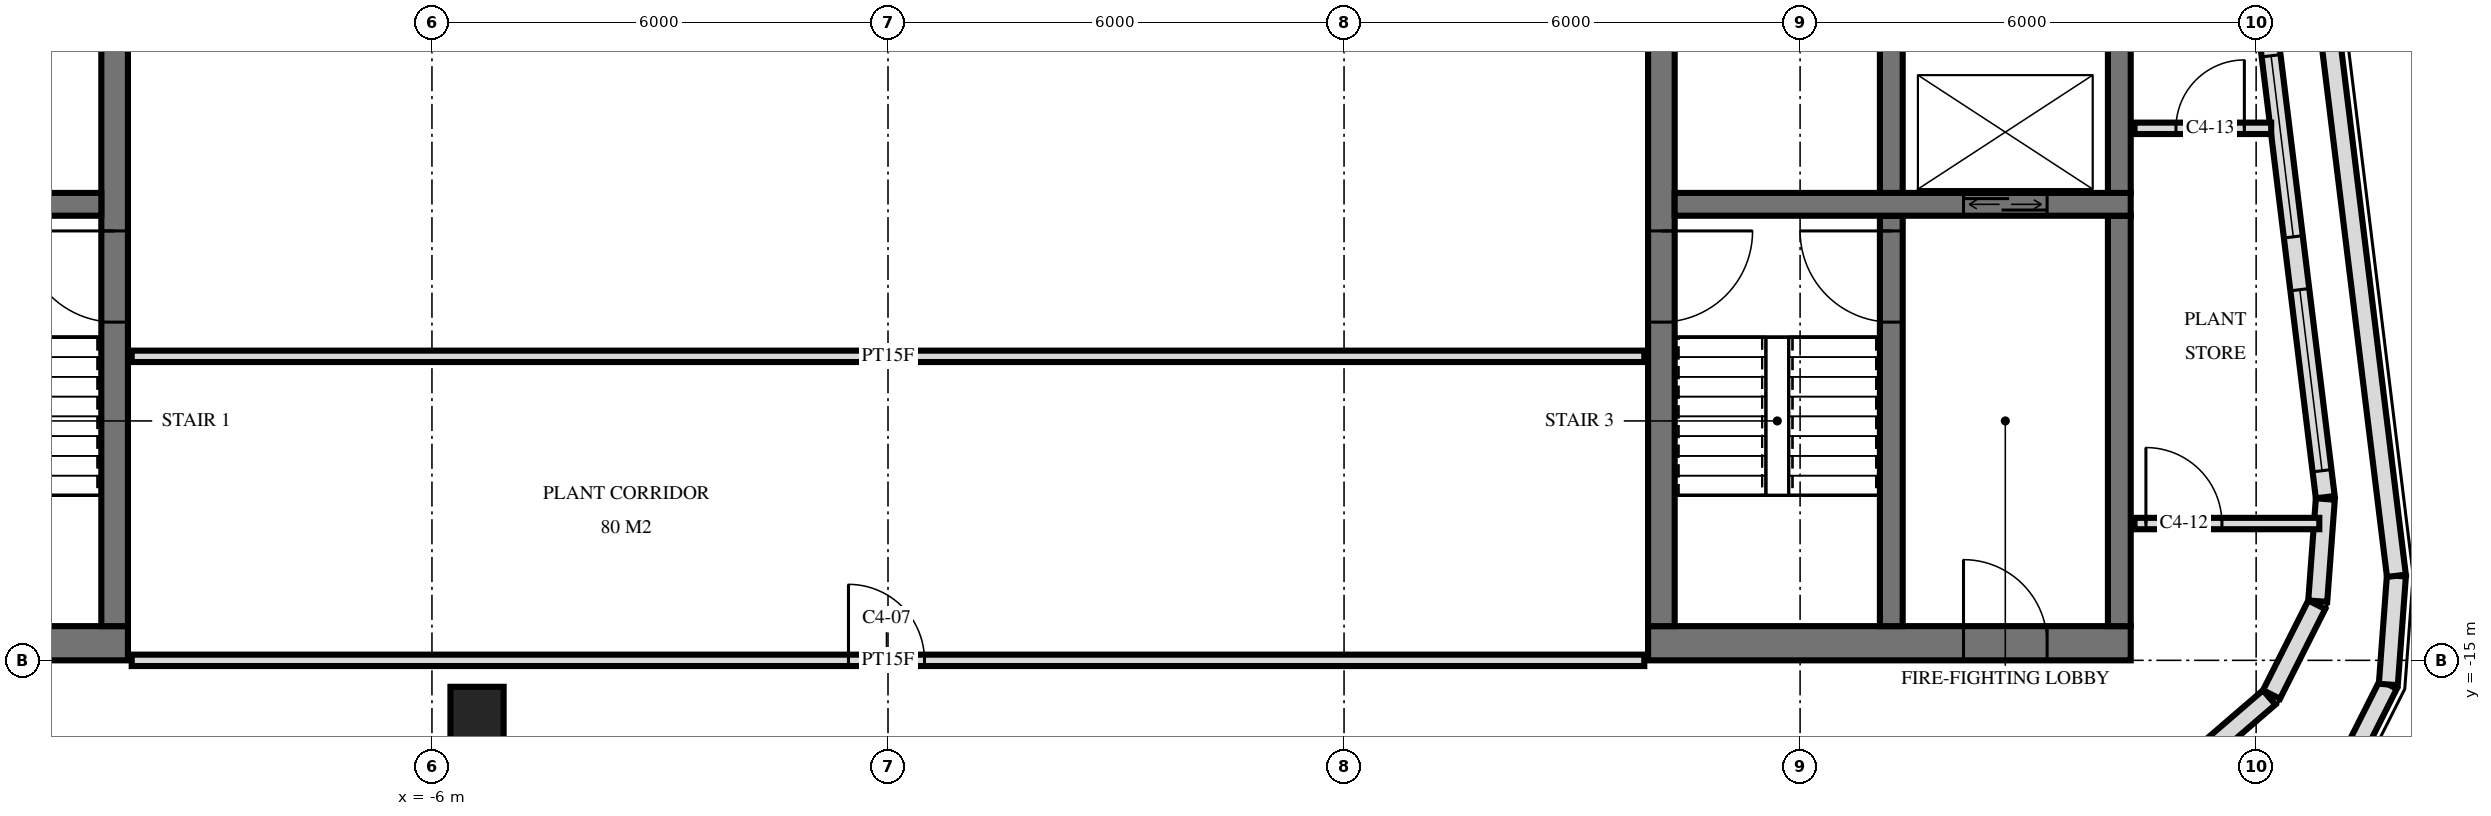
"""IFC4 building model, lengths in metres.
Left out: names, types, materials, properties, quantities, classifications, styles, units other than length and angle.
Written with IfcOpenShell. Run it as: python <this file> out.ifc"""

import sys

from ifc_helpers import new_model, si_unit, direction, frame, frame_2d, origin, origin_2d, place, context, subcontext, project, spatial, rectangle, extrude, element, fill, save


model = new_model("IFC4")
c1 = context("Model", 3, precision=1e-05, world=origin(), true_north=direction((0.0, 1.0)))
c2 = subcontext(c1, "Body", "Model", "MODEL_VIEW")
j1 = project(units=[si_unit("LENGTHUNIT", "METRE"), si_unit("PLANEANGLEUNIT", "RADIAN")], contexts=[c1])
p1 = place(None, origin())
s1 = spatial("IfcSite", under=j1, at=p1, CompositionType="ELEMENT")
p2 = place(p1, origin())
s2 = spatial("IfcBuilding", under=s1, at=p2, CompositionType="ELEMENT")
p3 = place(p2, frame((0.0, 0.0, 357.4)))
s3 = spatial("IfcBuildingStorey", under=s2, at=p3, CompositionType="ELEMENT", Elevation=357.4)
p4 = place(p3, frame((-5.407, -15.698, 0.0), z_axis=(0.0, 0.0, 1.0), x_axis=(1.0, 0.0, 0.0)))
e1 = element("IfcColumn", 1, at=p4, inside=s3, PredefinedType="COLUMN", context=c2, shape_type="SweptSolid", body=[
    extrude(rectangle(XDim=0.7, YDim=0.7, at=origin_2d()), origin(), (0.0, 0.0, 1.0), 6.0),
])
p5 = place(p3, frame((-16.35, -14.775, 0.0), z_axis=(0.0, 0.0, 1.0), x_axis=(1.0, 0.0, 0.0)))
e2 = element("IfcWall", 2, at=p5, inside=s3, PredefinedType="SHEAR", context=c2, shape_type="SweptSolid", body=[
    extrude(rectangle(XDim=6.35, YDim=0.45, at=frame_2d((3.175, 0.0))), origin(), (0.0, 0.0, 1.0), 6.0),
])
p6 = place(p5, frame((1.1, 0.0, 0.0)))
e3 = element("IfcOpeningElement", 3, at=p6, cuts=e2, PredefinedType="OPENING", context=c2, shape_type="SweptSolid", body=[
    extrude(rectangle(XDim=1.1, YDim=2.1, at=frame_2d((0.55, 1.05))), frame((0.0, 0.235, 0.0), z_axis=(0.0, -1.0, 0.0), x_axis=(1.0, 0.0, 0.0)), (0.0, 0.0, 1.0), 0.47),
])
p7 = place(p3, frame((-10.175, -14.55, 0.0), z_axis=(0.0, 0.0, 1.0), x_axis=(0.0, 1.0, 0.0)))
e4 = element("IfcWall", 4, at=p7, inside=s3, PredefinedType="SHEAR", context=c2, shape_type="SweptSolid", body=[
    extrude(rectangle(XDim=14.1, YDim=0.35, at=frame_2d((7.05, 0.0))), origin(), (0.0, 0.0, 1.0), 6.0),
])
p8 = place(p7, frame((4.0, 0.0, 0.0)))
e5 = element("IfcOpeningElement", 5, at=p8, cuts=e4, PredefinedType="OPENING", context=c2, shape_type="SweptSolid", body=[
    extrude(rectangle(XDim=1.2, YDim=2.1, at=frame_2d((0.6, 1.05))), frame((0.0, 0.185, 0.0), z_axis=(0.0, -1.0, 0.0), x_axis=(1.0, 0.0, 0.0)), (0.0, 0.0, 1.0), 0.37),
])
p9 = place(p3, frame((-16.35, -9.0, 0.0), z_axis=(0.0, 0.0, 1.0), x_axis=(1.0, 0.0, 0.0)))
e6 = element("IfcWall", 6, at=p9, inside=s3, PredefinedType="SHEAR", context=c2, shape_type="SweptSolid", body=[
    extrude(rectangle(XDim=6.0, YDim=0.3, at=frame_2d((3.0, 0.0))), origin(), (0.0, 0.0, 1.0), 6.0),
])
p10 = place(p9, frame((1.1, 0.0, 0.0)))
e7 = element("IfcOpeningElement", 7, at=p10, cuts=e6, PredefinedType="OPENING", context=c2, shape_type="SweptSolid", body=[
    extrude(rectangle(XDim=1.1, YDim=2.1, at=frame_2d((0.55, 1.05))), frame((0.0, 0.16, 0.0), z_axis=(0.0, -1.0, 0.0), x_axis=(1.0, 0.0, 0.0)), (0.0, 0.0, 1.0), 0.32),
])
p11 = place(p3, frame((10.0, -14.775, 0.0), z_axis=(0.0, 0.0, 1.0), x_axis=(1.0, 0.0, 0.0)))
e8 = element("IfcWall", 8, at=p11, inside=s3, PredefinedType="SHEAR", context=c2, shape_type="SweptSolid", body=[
    extrude(rectangle(XDim=6.35, YDim=0.45, at=frame_2d((3.175, 0.0))), origin(), (0.0, 0.0, 1.0), 6.0),
])
p12 = place(p11, frame((4.15, 0.0, 0.0)))
e9 = element("IfcOpeningElement", 9, at=p12, cuts=e8, PredefinedType="OPENING", context=c2, shape_type="SweptSolid", body=[
    extrude(rectangle(XDim=1.1, YDim=2.1, at=frame_2d((0.55, 1.05))), frame((0.0, 0.235, 0.0), z_axis=(0.0, -1.0, 0.0), x_axis=(1.0, 0.0, 0.0)), (0.0, 0.0, 1.0), 0.47),
])
p13 = place(p3, frame((10.175, -14.55, 0.0), z_axis=(0.0, 0.0, 1.0), x_axis=(0.0, 1.0, 0.0)))
e10 = element("IfcWall", 10, at=p13, inside=s3, PredefinedType="SHEAR", context=c2, shape_type="SweptSolid", body=[
    extrude(rectangle(XDim=14.1, YDim=0.35, at=frame_2d((7.05, 0.0))), origin(), (0.0, 0.0, 1.0), 6.0),
])
p14 = place(p13, frame((4.0, 0.0, 0.0)))
e11 = element("IfcOpeningElement", 11, at=p14, cuts=e10, PredefinedType="OPENING", context=c2, shape_type="SweptSolid", body=[
    extrude(rectangle(XDim=1.2, YDim=2.1, at=frame_2d((0.6, 1.05))), frame((0.0, 0.185, 0.0), z_axis=(0.0, -1.0, 0.0), x_axis=(1.0, 0.0, 0.0)), (0.0, 0.0, 1.0), 0.37),
])
p15 = place(p3, frame((16.2, -14.55, 0.0), z_axis=(0.0, 0.0, 1.0), x_axis=(0.0, 1.0, 0.0)))
e12 = element("IfcWall", 12, at=p15, inside=s3, PredefinedType="SHEAR", context=c2, shape_type="SweptSolid", body=[
    extrude(rectangle(XDim=5.4, YDim=0.3, at=frame_2d((2.7, 0.0))), origin(), (0.0, 0.0, 1.0), 6.0),
])
p16 = place(p3, frame((10.35, -9.0, 0.0), z_axis=(0.0, 0.0, 1.0), x_axis=(1.0, 0.0, 0.0)))
e13 = element("IfcWall", 13, at=p16, inside=s3, PredefinedType="SHEAR", context=c2, shape_type="SweptSolid", body=[
    extrude(rectangle(XDim=6.0, YDim=0.3, at=frame_2d((3.0, 0.0))), origin(), (0.0, 0.0, 1.0), 6.0),
])
p17 = place(p16, frame((3.8, 0.0, 0.0)))
e14 = element("IfcOpeningElement", 14, at=p17, cuts=e13, PredefinedType="OPENING", context=c2, shape_type="SweptSolid", body=[
    extrude(rectangle(XDim=1.1, YDim=2.1, at=frame_2d((0.55, 1.05))), frame((0.0, 0.16, 0.0), z_axis=(0.0, -1.0, 0.0), x_axis=(1.0, 0.0, 0.0)), (0.0, 0.0, 1.0), 0.32),
])
p18 = place(p3, frame((13.2, -14.55, 0.0), z_axis=(0.0, 0.0, 1.0), x_axis=(0.0, 1.0, 0.0)))
e15 = element("IfcWall", 15, at=p18, inside=s3, PredefinedType="SHEAR", context=c2, shape_type="SweptSolid", body=[
    extrude(rectangle(XDim=5.4, YDim=0.3, at=frame_2d((2.7, 0.0))), origin(), (0.0, 0.0, 1.0), 6.0),
])
p19 = place(p18, frame((4.0, 0.0, 0.0)))
e16 = element("IfcOpeningElement", 16, at=p19, cuts=e15, PredefinedType="OPENING", context=c2, shape_type="SweptSolid", body=[
    extrude(rectangle(XDim=1.2, YDim=2.1, at=frame_2d((0.6, 1.05))), frame((0.0, 0.16, 0.0), z_axis=(0.0, -1.0, 0.0), x_axis=(1.0, 0.0, 0.0)), (0.0, 0.0, 1.0), 0.32),
])
for number, where, z_axis, x_axis in (
    (17, (13.2, -8.85, 0.0), (0.0, 0.0, 1.0), (0.0, 1.0, 0.0)),
    (18, (16.2, -8.85, 0.0), (0.0, 0.0, 1.0), (0.0, 1.0, 0.0)),
):
    element("IfcWall", number, at=place(p3, frame(where, z_axis=z_axis, x_axis=x_axis)), inside=s3, PredefinedType="SHEAR", context=c2, shape_type="SweptSolid", body=[
        extrude(rectangle(XDim=2.3, YDim=0.3, at=frame_2d((1.15, 0.0))), origin(), (0.0, 0.0, 1.0), 6.0),
    ])
p20 = place(p3, frame((17.17, -16.352, 0.0), z_axis=(0.0, 0.0, 1.0), x_axis=(0.757573589708, 0.652749765359, 0.0)))
e19 = element("IfcWall", 19, at=p20, inside=s3, PredefinedType="SOLIDWALL", context=c2, shape_type="SweptSolid", body=[
    extrude(rectangle(XDim=1.323, YDim=0.25, at=frame_2d((0.662, 0.0))), origin(), (0.0, 0.0, 1.0), 5.59),
])
p21 = place(p3, frame((18.202, -15.45, 0.0), z_axis=(0.0, 0.0, 1.0), x_axis=(0.44994291098, 0.89305732003, 0.0)))
e20 = element("IfcWall", 20, at=p21, inside=s3, PredefinedType="SOLIDWALL", context=c2, shape_type="SweptSolid", body=[
    extrude(rectangle(XDim=1.323, YDim=0.25, at=frame_2d((0.661, 0.0))), origin(), (0.0, 0.0, 1.0), 5.59),
])
p22 = place(p3, frame((18.81, -14.221, 0.0), z_axis=(0.0, 0.0, 1.0), x_axis=(0.074258626379, 0.99723901669, 0.0)))
e21 = element("IfcWall", 21, at=p22, inside=s3, PredefinedType="SOLIDWALL", context=c2, shape_type="SweptSolid", body=[
    extrude(rectangle(XDim=1.348, YDim=0.25, at=frame_2d((0.674, 0.0))), origin(), (0.0, 0.0, 1.0), 5.59),
])
p23 = place(p3, frame((18.91, -12.853, 0.0), z_axis=(0.0, 0.0, 1.0), x_axis=(-0.121859728622, 0.992547332141, 0.0)))
e22 = element("IfcWall", 22, at=p23, inside=s3, PredefinedType="SOLIDWALL", context=c2, shape_type="SweptSolid", body=[
    extrude(rectangle(XDim=15.503, YDim=0.25, at=frame_2d((7.751, 0.0))), origin(), (0.0, 0.0, 1.0), 5.59),
])
p24 = place(p23, frame((0.35, 0.0, 0.838)))
e23 = element("IfcOpeningElement", 23, at=p24, cuts=e22, PredefinedType="OPENING", context=c2, shape_type="SweptSolid", body=[
    extrude(rectangle(XDim=2.4, YDim=3.6, at=frame_2d((1.2, 1.8))), frame((0.0, 0.135, 0.0), z_axis=(0.0, -1.0, 0.0), x_axis=(1.0, 0.0, 0.0)), (0.0, 0.0, 1.0), 0.27),
])
p25 = place(p23, frame((3.451, 0.0, 0.838)))
e24 = element("IfcOpeningElement", 24, at=p25, cuts=e22, PredefinedType="OPENING", context=c2, shape_type="SweptSolid", body=[
    extrude(rectangle(XDim=2.4, YDim=3.6, at=frame_2d((1.2, 1.8))), frame((0.0, 0.135, 0.0), z_axis=(0.0, -1.0, 0.0), x_axis=(1.0, 0.0, 0.0)), (0.0, 0.0, 1.0), 0.27),
])
p26 = place(p23, frame((6.552, 0.0, 0.838)))
e25 = element("IfcOpeningElement", 25, at=p26, cuts=e22, PredefinedType="OPENING", context=c2, shape_type="SweptSolid", body=[
    extrude(rectangle(XDim=2.4, YDim=3.6, at=frame_2d((1.2, 1.8))), frame((0.0, 0.135, 0.0), z_axis=(0.0, -1.0, 0.0), x_axis=(1.0, 0.0, 0.0)), (0.0, 0.0, 1.0), 0.27),
])
p27 = place(p23, frame((9.652, 0.0, 0.838)))
e26 = element("IfcOpeningElement", 26, at=p27, cuts=e22, PredefinedType="OPENING", context=c2, shape_type="SweptSolid", body=[
    extrude(rectangle(XDim=2.4, YDim=3.6, at=frame_2d((1.2, 1.8))), frame((0.0, 0.135, 0.0), z_axis=(0.0, -1.0, 0.0), x_axis=(1.0, 0.0, 0.0)), (0.0, 0.0, 1.0), 0.27),
])
p28 = place(p23, frame((12.752, 0.0, 0.838)))
e27 = element("IfcOpeningElement", 27, at=p28, cuts=e22, PredefinedType="OPENING", context=c2, shape_type="SweptSolid", body=[
    extrude(rectangle(XDim=2.4, YDim=3.6, at=frame_2d((1.2, 1.8))), frame((0.0, 0.135, 0.0), z_axis=(0.0, -1.0, 0.0), x_axis=(1.0, 0.0, 0.0)), (0.0, 0.0, 1.0), 0.27),
])
p29 = place(p3, frame((17.853, 2.341, 0.0), z_axis=(0.0, 0.0, 1.0), x_axis=(0.121860332662, -0.99254725798, 0.0)))
e28 = element("IfcWall", 28, at=p29, inside=s3, PredefinedType="PARAPET", context=c2, shape_type="SweptSolid", body=[
    extrude(rectangle(XDim=16.35, YDim=0.25, at=frame_2d((8.175, 0.0))), origin(), (0.0, 0.0, 1.0), 1.1),
])
p30 = place(p3, frame((19.845, -13.888, 0.0), z_axis=(0.0, 0.0, 1.0), x_axis=(-0.074078687454, -0.997252399378, 0.0)))
e29 = element("IfcWall", 29, at=p30, inside=s3, PredefinedType="PARAPET", context=c2, shape_type="SweptSolid", body=[
    extrude(rectangle(XDim=1.434, YDim=0.25, at=frame_2d((0.717, 0.0))), origin(), (0.0, 0.0, 1.0), 1.1),
])
p31 = place(p3, frame((19.739, -15.317, 0.0), z_axis=(0.0, 0.0, 1.0), x_axis=(-0.450047928384, -0.893004402093, 0.0)))
e30 = element("IfcWall", 30, at=p31, inside=s3, PredefinedType="PARAPET", context=c2, shape_type="SweptSolid", body=[
    extrude(rectangle(XDim=1.412, YDim=0.25, at=frame_2d((0.706, 0.0))), origin(), (0.0, 0.0, 1.0), 1.1),
])
p32 = place(p3, frame((-9.95, -15.0, 0.0), z_axis=(0.0, 0.0, 1.0), x_axis=(1.0, 0.0, 0.0)))
e31 = element("IfcWall", 31, at=p32, inside=s3, PredefinedType="PARTITIONING", context=c2, shape_type="SweptSolid", body=[
    extrude(rectangle(XDim=19.9, YDim=0.15, at=frame_2d((9.95, 0.0))), origin(), (0.0, 0.0, 1.0), 4.954),
])
p33 = place(p32, frame((9.43, 0.0, 0.0)))
e32 = element("IfcOpeningElement", 32, at=p33, cuts=e31, PredefinedType="OPENING", context=c2, shape_type="SweptSolid", body=[
    extrude(rectangle(XDim=1.0, YDim=2.1, at=frame_2d((0.5, 1.05))), frame((0.0, 0.085, 0.0), z_axis=(0.0, -1.0, 0.0), x_axis=(1.0, 0.0, 0.0)), (0.0, 0.0, 1.0), 0.17),
])
p34 = place(p3, frame((16.4, -13.2, 0.0), z_axis=(0.0, 0.0, 1.0), x_axis=(1.0, 0.0, 0.0)))
e33 = element("IfcWall", 33, at=p34, inside=s3, PredefinedType="PARTITIONING", context=c2, shape_type="SweptSolid", body=[
    extrude(rectangle(XDim=2.431, YDim=0.15, at=frame_2d((1.216, 0.0))), origin(), (0.0, 0.0, 1.0), 5.72),
])
p35 = place(p34, frame((0.15, 0.0, 0.0)))
e34 = element("IfcOpeningElement", 34, at=p35, cuts=e33, PredefinedType="OPENING", context=c2, shape_type="SweptSolid", body=[
    extrude(rectangle(XDim=1.0, YDim=2.1, at=frame_2d((0.5, 1.05))), frame((0.0, 0.085, 0.0), z_axis=(0.0, -1.0, 0.0), x_axis=(1.0, 0.0, 0.0)), (0.0, 0.0, 1.0), 0.17),
])
p36 = place(p3, frame((-9.95, -11.0, 0.0), z_axis=(0.0, 0.0, 1.0), x_axis=(1.0, 0.0, 0.0)))
e35 = element("IfcWall", 35, at=p36, inside=s3, PredefinedType="PARTITIONING", context=c2, shape_type="SweptSolid", body=[
    extrude(rectangle(XDim=19.9, YDim=0.15, at=frame_2d((9.95, 0.0))), origin(), (0.0, 0.0, 1.0), 5.72),
])
p37 = place(p3, frame((16.4, -8.0, 0.0), z_axis=(0.0, 0.0, 1.0), x_axis=(1.0, 0.0, 0.0)))
e36 = element("IfcWall", 36, at=p37, inside=s3, PredefinedType="PARTITIONING", context=c2, shape_type="SweptSolid", body=[
    extrude(rectangle(XDim=1.798, YDim=0.15, at=frame_2d((0.899, 0.0))), origin(), (0.0, 0.0, 1.0), 5.72),
])
p38 = place(p37, frame((0.545, 0.0, 0.0)))
e37 = element("IfcOpeningElement", 37, at=p38, cuts=e36, PredefinedType="OPENING", context=c2, shape_type="SweptSolid", body=[
    extrude(rectangle(XDim=0.9, YDim=2.1, at=frame_2d((0.45, 1.05))), frame((0.0, 0.085, 0.0), z_axis=(0.0, -1.0, 0.0), x_axis=(1.0, 0.0, 0.0)), (0.0, 0.0, 1.0), 0.17),
])
p39 = place(p24, origin())
e38 = element("IfcWindow", 38, at=p39, inside=s3, PartitioningType="SINGLE_PANEL", PredefinedType="USERDEFINED", context=c2, shape_type="SweptSolid", body=[
    extrude(rectangle(XDim=2.4, YDim=3.6, at=frame_2d((1.2, 1.8))), frame((0.0, 0.03, 0.0), z_axis=(0.0, -1.0, 0.0), x_axis=(1.0, 0.0, 0.0)), (0.0, 0.0, 1.0), 0.06),
])
fill(e23, e38)
p40 = place(p25, origin())
e39 = element("IfcWindow", 39, at=p40, inside=s3, PartitioningType="SINGLE_PANEL", PredefinedType="USERDEFINED", context=c2, shape_type="SweptSolid", body=[
    extrude(rectangle(XDim=2.4, YDim=3.6, at=frame_2d((1.2, 1.8))), frame((0.0, 0.03, 0.0), z_axis=(0.0, -1.0, 0.0), x_axis=(1.0, 0.0, 0.0)), (0.0, 0.0, 1.0), 0.06),
])
fill(e24, e39)
p41 = place(p17, origin())
e40 = element("IfcDoor", 40, at=p41, inside=s3, OperationType="DOUBLE_DOOR_SLIDING", PredefinedType="USERDEFINED", context=c2, shape_type="SweptSolid", body=[
    extrude(rectangle(XDim=1.1, YDim=2.1, at=frame_2d((0.55, 1.05))), frame((0.0, 0.025, 0.0), z_axis=(0.0, -1.0, 0.0), x_axis=(1.0, 0.0, 0.0)), (0.0, 0.0, 1.0), 0.05),
])
fill(e14, e40)
p42 = place(p8, origin())
e41 = element("IfcDoor", 41, at=p42, inside=s3, OperationType="SINGLE_SWING_LEFT", PredefinedType="DOOR", context=c2, shape_type="SweptSolid", body=[
    extrude(rectangle(XDim=1.2, YDim=2.1, at=frame_2d((0.6, 1.05))), frame((0.0, 0.025, 0.0), z_axis=(0.0, -1.0, 0.0), x_axis=(1.0, 0.0, 0.0)), (0.0, 0.0, 1.0), 0.05),
])
fill(e5, e41)
p43 = place(p14, frame((0.6, 0.0, 0.0), z_axis=(0.0, 0.0, 1.0), x_axis=(-1.0, 0.0, 0.0)))
e42 = element("IfcDoor", 42, at=p43, inside=s3, OperationType="SINGLE_SWING_RIGHT", PredefinedType="DOOR", context=c2, shape_type="SweptSolid", body=[
    extrude(rectangle(XDim=1.2, YDim=2.1, at=frame_2d((0.0, 1.05))), frame((0.0, -0.025, 0.0), z_axis=(0.0, 1.0, 0.0), x_axis=(-1.0, 0.0, 0.0)), (0.0, 0.0, 1.0), 0.05),
])
fill(e11, e42)
p44 = place(p12, origin())
e43 = element("IfcDoor", 43, at=p44, inside=s3, OperationType="SINGLE_SWING_RIGHT", PredefinedType="DOOR", context=c2, shape_type="SweptSolid", body=[
    extrude(rectangle(XDim=1.1, YDim=2.1, at=frame_2d((0.55, 1.05))), frame((0.0, 0.025, 0.0), z_axis=(0.0, -1.0, 0.0), x_axis=(1.0, 0.0, 0.0)), (0.0, 0.0, 1.0), 0.05),
])
fill(e9, e43)
p45 = place(p19, origin())
e44 = element("IfcDoor", 44, at=p45, inside=s3, OperationType="SINGLE_SWING_LEFT", PredefinedType="DOOR", context=c2, shape_type="SweptSolid", body=[
    extrude(rectangle(XDim=1.2, YDim=2.1, at=frame_2d((0.6, 1.05))), frame((0.0, 0.025, 0.0), z_axis=(0.0, -1.0, 0.0), x_axis=(1.0, 0.0, 0.0)), (0.0, 0.0, 1.0), 0.05),
])
fill(e16, e44)
p46 = place(p33, origin())
e45 = element("IfcDoor", 45, at=p46, inside=s3, OperationType="SINGLE_SWING_RIGHT", PredefinedType="DOOR", context=c2, shape_type="SweptSolid", body=[
    extrude(rectangle(XDim=1.0, YDim=2.1, at=frame_2d((0.5, 1.05))), frame((0.0, 0.025, 0.0), z_axis=(0.0, -1.0, 0.0), x_axis=(1.0, 0.0, 0.0)), (0.0, 0.0, 1.0), 0.05),
])
fill(e32, e45)
p47 = place(p35, origin())
e46 = element("IfcDoor", 46, at=p47, inside=s3, OperationType="SINGLE_SWING_RIGHT", PredefinedType="DOOR", context=c2, shape_type="SweptSolid", body=[
    extrude(rectangle(XDim=1.0, YDim=2.1, at=frame_2d((0.5, 1.05))), frame((0.0, 0.025, 0.0), z_axis=(0.0, -1.0, 0.0), x_axis=(1.0, 0.0, 0.0)), (0.0, 0.0, 1.0), 0.05),
])
fill(e34, e46)
p48 = place(p38, origin())
e47 = element("IfcDoor", 47, at=p48, inside=s3, OperationType="SINGLE_SWING_LEFT", PredefinedType="DOOR", context=c2, shape_type="SweptSolid", body=[
    extrude(rectangle(XDim=0.9, YDim=2.1, at=frame_2d((0.45, 1.05))), frame((0.0, 0.025, 0.0), z_axis=(0.0, -1.0, 0.0), x_axis=(1.0, 0.0, 0.0)), (0.0, 0.0, 1.0), 0.05),
])
fill(e37, e47)
save(model, sys.argv[1])
